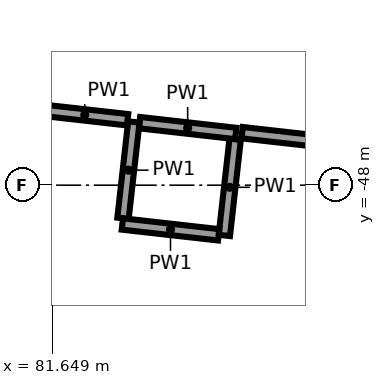
"""IFC4 building model, lengths in metres.
Left out: names, types, materials, properties, quantities, classifications, styles, units other than length and angle.
Written with IfcOpenShell. Run it as: python <this file> out.ifc"""

import sys

from ifc_helpers import new_model, si_unit, direction, frame, frame_2d, origin, place, context, subcontext, project, spatial, rectangle, extrude, element, save


model = new_model("IFC4")
c1 = context("Model", 3, precision=1e-05, world=origin(), true_north=direction((0.0, 1.0)))
c2 = subcontext(c1, "Body", "Model", "MODEL_VIEW")
j1 = project(units=[si_unit("LENGTHUNIT", "METRE"), si_unit("PLANEANGLEUNIT", "RADIAN")], contexts=[c1])
p1 = place(None, origin())
s1 = spatial("IfcSite", under=j1, at=p1, CompositionType="ELEMENT")
p2 = place(p1, origin())
s2 = spatial("IfcBuilding", under=s1, at=p2, CompositionType="ELEMENT")
p3 = place(p2, frame((0.0, 0.0, 12.0)))
s3 = spatial("IfcBuildingStorey", under=s2, at=p3, CompositionType="ELEMENT", Elevation=12.0)
for number, where, z_axis, x_axis in (
    (1, (83.913, -48.662, 0.0), (0.0, 0.0, 1.0), (0.112, 0.994, 0.0)),
    (2, (84.064, -47.32, 0.0), (0.0, 0.0, 1.0), (-0.994, 0.112, 0.0)),
):
    element("IfcWall", number, at=place(p3, frame(where, z_axis=z_axis, x_axis=x_axis)), inside=s3, PredefinedType="PARTITIONING", context=c2, shape_type="SweptSolid", body=[
        extrude(rectangle(XDim=1.275, YDim=0.15, at=frame_2d((0.638, 0.0))), origin(), (0.0, 0.0, 1.0), 5.65),
    ])
for number, where, z_axis, x_axis in (
    (3, (82.723, -47.169, 0.0), (0.0, 0.0, 1.0), (-0.112, -0.994, 0.0)),
    (4, (82.572, -48.51, 0.0), (0.0, 0.0, 1.0), (0.994, -0.112, 0.0)),
):
    element("IfcWall", number, at=place(p3, frame(where, z_axis=z_axis, x_axis=x_axis)), inside=s3, PredefinedType="PARTITIONING", context=c2, shape_type="SweptSolid", body=[
        extrude(rectangle(XDim=1.275, YDim=0.15, at=frame_2d((0.637, 0.0))), origin(), (0.0, 0.0, 1.0), 5.65),
    ])
p4 = place(p3, frame((82.641, -47.139, 0.0), z_axis=(0.0, 0.0, 1.0), x_axis=(-0.993725340882, 0.111847873866, 0.0)))
e5 = element("IfcWall", 5, at=p4, inside=s3, PredefinedType="PARTITIONING", context=c2, shape_type="SweptSolid", body=[
    extrude(rectangle(XDim=1.135, YDim=0.15, at=frame_2d((0.567, 0.0))), origin(), (0.0, 0.0, 1.0), 5.65),
])
p5 = place(p3, frame((87.827, -47.724, 0.0), z_axis=(0.0, 0.0, 1.0), x_axis=(-0.993708869306, 0.11199412066, 0.0)))
e6 = element("IfcWall", 6, at=p5, inside=s3, PredefinedType="PARTITIONING", context=c2, shape_type="SweptSolid", body=[
    extrude(rectangle(XDim=3.704, YDim=0.15, at=frame_2d((1.852, 0.0))), origin(), (0.0, 0.0, 1.0), 4.55),
])
p6 = place(p5, frame((0.65, 0.0, 0.0)))
e7 = element("IfcOpeningElement", 7, at=p6, cuts=e6, PredefinedType="OPENING", context=c2, shape_type="SweptSolid", body=[
    extrude(rectangle(XDim=1.8, YDim=2.1, at=frame_2d((0.9, 1.05))), frame((0.0, 0.085, 0.0), z_axis=(0.0, -1.0, 0.0), x_axis=(1.0, 0.0, 0.0)), (0.0, 0.0, 1.0), 0.17),
])
save(model, sys.argv[1])
